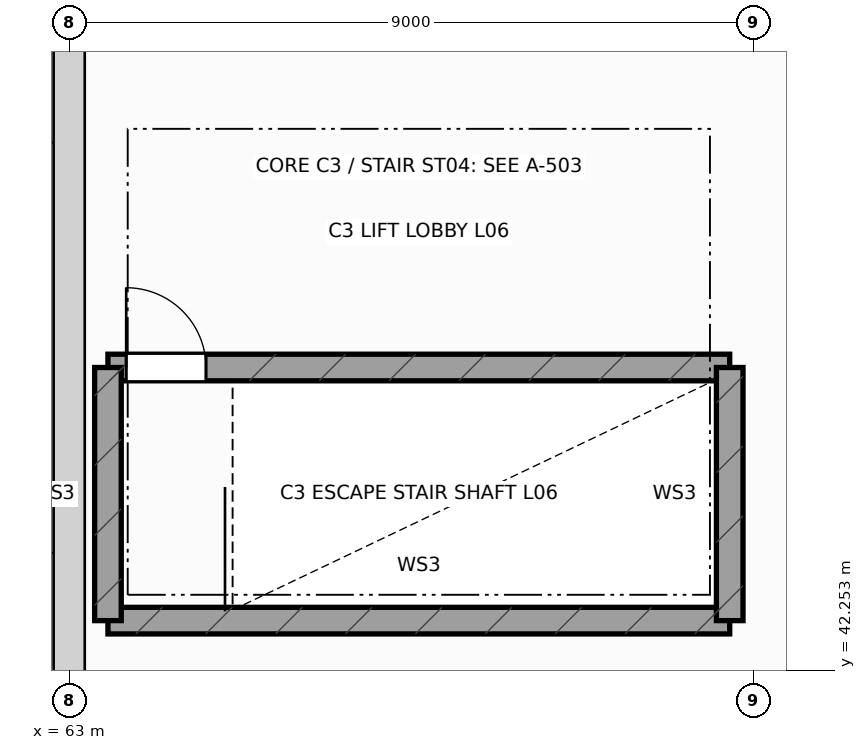
"""IFC4 building model, lengths in metres.
Left out: names, types, materials, properties, quantities, classifications, styles, units other than length and angle.
Written with IfcOpenShell. Run it as: python <this file> out.ifc"""

import sys

from ifc_helpers import new_model, si_unit, direction, frame, frame_2d, origin, place, context, subcontext, project, spatial, rectangle, extrude, element, fill, save


model = new_model("IFC4")
c1 = context("Model", 3, precision=1e-05, world=origin(), true_north=direction((0.0, 1.0)))
c2 = subcontext(c1, "Body", "Model", "MODEL_VIEW")
j1 = project(units=[si_unit("LENGTHUNIT", "METRE"), si_unit("PLANEANGLEUNIT", "RADIAN")], contexts=[c1])
p1 = place(None, origin())
s1 = spatial("IfcSite", under=j1, at=p1, CompositionType="ELEMENT")
p2 = place(p1, origin())
s2 = spatial("IfcBuilding", under=s1, at=p2, CompositionType="ELEMENT")
p3 = place(p2, frame((0.0, 0.0, 30.6)))
s3 = spatial("IfcBuildingStorey", under=s2, at=p3, CompositionType="ELEMENT", Elevation=30.6)
p4 = place(p3, frame((63.0, 51.16, 0.0), z_axis=(0.0, 0.0, 1.0), x_axis=(0.0, -1.0, 0.0)))
e1 = element("IfcWall", 1, at=p4, inside=s3, PredefinedType="SOLIDWALL", context=c2, shape_type="SweptSolid", body=[
    extrude(rectangle(XDim=9.32, YDim=0.41, at=frame_2d((4.66, 0.0))), origin(), (0.0, 0.0, 1.0), 3.955),
])
p5 = place(p3, frame((63.51, 42.91, 0.0), z_axis=(0.0, 0.0, 1.0), x_axis=(1.0, 0.0, 0.0)))
e2 = element("IfcWall", 2, at=p5, inside=s3, PredefinedType="SHEAR", context=c2, shape_type="SweptSolid", body=[
    extrude(rectangle(XDim=8.18, YDim=0.35, at=frame_2d((4.09, 0.0))), origin(), (0.0, 0.0, 1.0), 3.8),
])
p6 = place(p3, frame((63.51, 46.24, 0.0), z_axis=(0.0, 0.0, 1.0), x_axis=(1.0, 0.0, 0.0)))
e3 = element("IfcWall", 3, at=p6, inside=s3, PredefinedType="SHEAR", context=c2, shape_type="SweptSolid", body=[
    extrude(rectangle(XDim=8.18, YDim=0.35, at=frame_2d((4.09, 0.0))), origin(), (0.0, 0.0, 1.0), 3.8),
])
p7 = place(p6, frame((0.24, 0.0, 0.0)))
e4 = element("IfcOpeningElement", 4, at=p7, cuts=e3, PredefinedType="OPENING", context=c2, shape_type="SweptSolid", body=[
    extrude(rectangle(XDim=1.05, YDim=2.18, at=frame_2d((0.525, 1.09))), frame((0.0, 0.185, 0.0), z_axis=(0.0, -1.0, 0.0), x_axis=(1.0, 0.0, 0.0)), (0.0, 0.0, 1.0), 0.37),
])
for number, where, z_axis, x_axis in (
    (5, (63.51, 42.91, 0.0), (0.0, 0.0, 1.0), (0.0, 1.0, 0.0)),
    (6, (71.69, 42.91, 0.0), (0.0, 0.0, 1.0), (0.0, 1.0, 0.0)),
):
    element("IfcWall", number, at=place(p3, frame(where, z_axis=z_axis, x_axis=x_axis)), inside=s3, PredefinedType="SHEAR", context=c2, shape_type="SweptSolid", body=[
        extrude(rectangle(XDim=3.33, YDim=0.35, at=frame_2d((1.665, 0.0))), origin(), (0.0, 0.0, 1.0), 3.8),
    ])
p8 = place(p7, origin())
e7 = element("IfcDoor", 7, at=p8, inside=s3, OperationType="SINGLE_SWING_LEFT", PredefinedType="DOOR", context=c2, shape_type="SweptSolid", body=[
    extrude(rectangle(XDim=1.05, YDim=2.18, at=frame_2d((0.525, 1.09))), frame((0.0, 0.025, 0.0), z_axis=(0.0, -1.0, 0.0), x_axis=(1.0, 0.0, 0.0)), (0.0, 0.0, 1.0), 0.05),
])
fill(e4, e7)
save(model, sys.argv[1])
